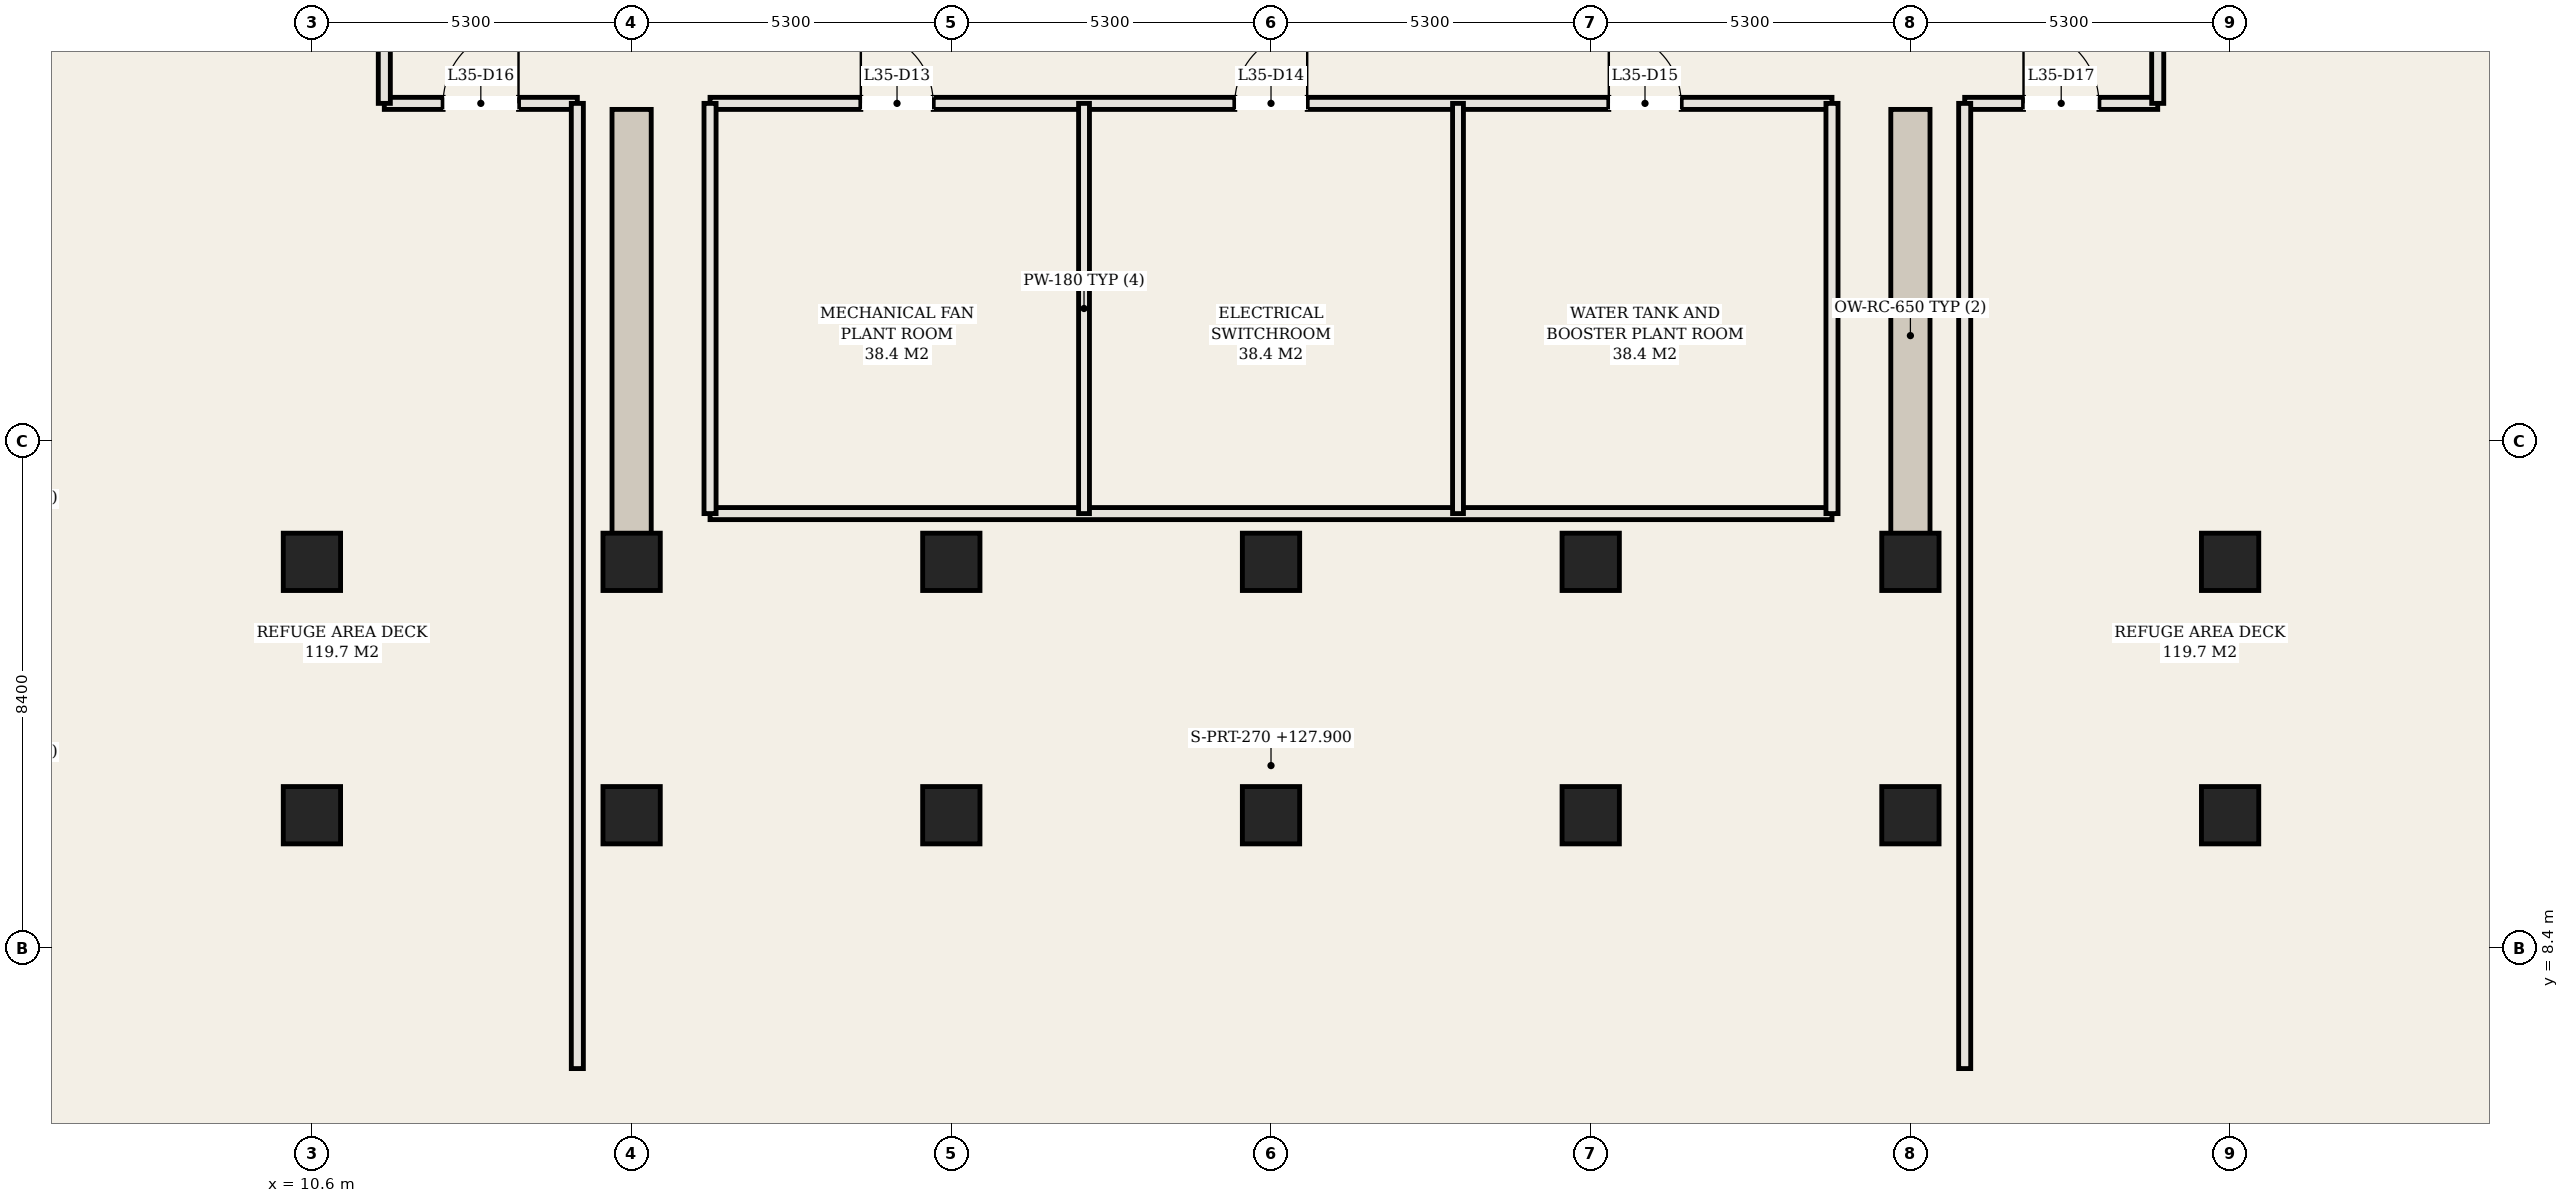
"""IFC4 building model, lengths in metres.
Left out: names, types, materials, properties, quantities, classifications, styles, units other than length and angle.
Written with IfcOpenShell. Run it as: python <this file> out.ifc"""

import sys

from ifc_helpers import new_model, si_unit, direction, frame, frame_2d, origin, origin_2d, place, context, subcontext, project, spatial, rectangle, hollow_rectangle, extrude, element, fill, save


model = new_model("IFC4")
c1 = context("Model", 3, precision=1e-05, world=origin(), true_north=direction((0.0, 1.0)))
c2 = subcontext(c1, "Body", "Model", "MODEL_VIEW")
j1 = project(units=[si_unit("LENGTHUNIT", "METRE"), si_unit("PLANEANGLEUNIT", "RADIAN")], contexts=[c1])
p1 = place(None, origin())
s1 = spatial("IfcSite", under=j1, at=p1, CompositionType="ELEMENT")
p2 = place(p1, origin())
s2 = spatial("IfcBuilding", under=s1, at=p2, CompositionType="ELEMENT")
p3 = place(p2, frame((0.0, 0.0, 127.9)))
s3 = spatial("IfcBuildingStorey", under=s2, at=p3, CompositionType="ELEMENT", Elevation=127.9)
for number, where, z_axis, x_axis in (
    (1, (15.9, 14.8, 0.0), (0.0, 0.0, 1.0), (0.0, 1.0, 0.0)),
    (2, (37.1, 14.8, 0.0), (0.0, 0.0, 1.0), (0.0, 1.0, 0.0)),
):
    element("IfcWall", number, at=place(p3, frame(where, z_axis=z_axis, x_axis=x_axis)), inside=s3, PredefinedType="SHEAR", context=c2, shape_type="SweptSolid", body=[
        extrude(rectangle(XDim=7.5, YDim=0.65, at=frame_2d((3.75, 0.0))), origin(), (0.0, 0.0, 1.0), 6.56),
    ])
for number, where, z_axis, x_axis in (
    (3, (10.6, 14.8, 0.0), (0.0, 0.0, 1.0), (1.0, 0.0, 0.0)),
    (4, (10.6, 10.6, 0.0), (0.0, 0.0, 1.0), (1.0, 0.0, 0.0)),
    (5, (15.9, 14.8, 0.0), (0.0, 0.0, 1.0), (1.0, 0.0, 0.0)),
    (6, (15.9, 10.6, 0.0), (0.0, 0.0, 1.0), (1.0, 0.0, 0.0)),
    (7, (21.2, 14.8, 0.0), (0.0, 0.0, 1.0), (1.0, 0.0, 0.0)),
    (8, (21.2, 10.6, 0.0), (0.0, 0.0, 1.0), (1.0, 0.0, 0.0)),
    (9, (26.5, 14.8, 0.0), (0.0, 0.0, 1.0), (1.0, 0.0, 0.0)),
    (10, (26.5, 10.6, 0.0), (0.0, 0.0, 1.0), (1.0, 0.0, 0.0)),
    (11, (31.8, 14.8, 0.0), (0.0, 0.0, 1.0), (1.0, 0.0, 0.0)),
    (12, (31.8, 10.6, 0.0), (0.0, 0.0, 1.0), (1.0, 0.0, 0.0)),
    (13, (37.1, 14.8, 0.0), (0.0, 0.0, 1.0), (1.0, 0.0, 0.0)),
    (14, (37.1, 10.6, 0.0), (0.0, 0.0, 1.0), (1.0, 0.0, 0.0)),
    (15, (42.4, 14.8, 0.0), (0.0, 0.0, 1.0), (1.0, 0.0, 0.0)),
    (16, (42.4, 10.6, 0.0), (0.0, 0.0, 1.0), (1.0, 0.0, 0.0)),
):
    element("IfcColumn", number, at=place(p3, frame(where, z_axis=z_axis, x_axis=x_axis)), inside=s3, PredefinedType="COLUMN", context=c2, shape_type="SweptSolid", body=[
        extrude(hollow_rectangle(XDim=0.95, YDim=0.95, WallThickness=0.032, at=origin_2d()), origin(), (0.0, 0.0, 1.0), 6.8),
    ])
p4 = place(p3, frame((17.2, 22.4, 0.0), z_axis=(0.0, 0.0, 1.0), x_axis=(1.0, 0.0, 0.0)))
e17 = element("IfcWall", 17, at=p4, inside=s3, PredefinedType="PARTITIONING", context=c2, shape_type="SweptSolid", body=[
    extrude(rectangle(XDim=18.6, YDim=0.2, at=frame_2d((9.3, 0.0))), origin(), (0.0, 0.0, 1.0), 6.56),
])
p5 = place(p4, frame((2.5, 0.0, 0.0)))
e18 = element("IfcOpeningElement", 18, at=p5, cuts=e17, PredefinedType="OPENING", context=c2, shape_type="SweptSolid", body=[
    extrude(rectangle(XDim=1.2, YDim=2.2, at=frame_2d((0.6, 1.1))), frame((0.0, 0.11, 0.0), z_axis=(0.0, -1.0, 0.0), x_axis=(1.0, 0.0, 0.0)), (0.0, 0.0, 1.0), 0.22),
])
p6 = place(p4, frame((8.7, 0.0, 0.0)))
e19 = element("IfcOpeningElement", 19, at=p6, cuts=e17, PredefinedType="OPENING", context=c2, shape_type="SweptSolid", body=[
    extrude(rectangle(XDim=1.2, YDim=2.2, at=frame_2d((0.6, 1.1))), frame((0.0, 0.11, 0.0), z_axis=(0.0, -1.0, 0.0), x_axis=(1.0, 0.0, 0.0)), (0.0, 0.0, 1.0), 0.22),
])
p7 = place(p4, frame((14.9, 0.0, 0.0)))
e20 = element("IfcOpeningElement", 20, at=p7, cuts=e17, PredefinedType="OPENING", context=c2, shape_type="SweptSolid", body=[
    extrude(rectangle(XDim=1.2, YDim=2.2, at=frame_2d((0.6, 1.1))), frame((0.0, 0.11, 0.0), z_axis=(0.0, -1.0, 0.0), x_axis=(1.0, 0.0, 0.0)), (0.0, 0.0, 1.0), 0.22),
])
p8 = place(p3, frame((17.2, 15.6, 0.0), z_axis=(0.0, 0.0, 1.0), x_axis=(1.0, 0.0, 0.0)))
e21 = element("IfcWall", 21, at=p8, inside=s3, PredefinedType="PARTITIONING", context=c2, shape_type="SweptSolid", body=[
    extrude(rectangle(XDim=18.6, YDim=0.2, at=frame_2d((9.3, 0.0))), origin(), (0.0, 0.0, 1.0), 6.56),
])
for number, where, z_axis, x_axis in (
    (22, (17.2, 15.6, 0.0), (0.0, 0.0, 1.0), (0.0, 1.0, 0.0)),
    (23, (35.8, 15.6, 0.0), (0.0, 0.0, 1.0), (0.0, 1.0, 0.0)),
):
    element("IfcWall", number, at=place(p3, frame(where, z_axis=z_axis, x_axis=x_axis)), inside=s3, PredefinedType="PARTITIONING", context=c2, shape_type="SweptSolid", body=[
        extrude(rectangle(XDim=6.8, YDim=0.2, at=frame_2d((3.4, 0.0))), origin(), (0.0, 0.0, 1.0), 6.56),
    ])
for number, where, z_axis, x_axis in (
    (24, (23.4, 15.6, 0.0), (0.0, 0.0, 1.0), (0.0, 1.0, 0.0)),
    (25, (29.6, 15.6, 0.0), (0.0, 0.0, 1.0), (0.0, 1.0, 0.0)),
):
    element("IfcWall", number, at=place(p3, frame(where, z_axis=z_axis, x_axis=x_axis)), inside=s3, PredefinedType="PARTITIONING", context=c2, shape_type="SweptSolid", body=[
        extrude(rectangle(XDim=6.8, YDim=0.18, at=frame_2d((3.4, 0.0))), origin(), (0.0, 0.0, 1.0), 6.56),
    ])
p9 = place(p3, frame((11.8, 22.4, 0.0), z_axis=(0.0, 0.0, 1.0), x_axis=(1.0, 0.0, 0.0)))
e26 = element("IfcWall", 26, at=p9, inside=s3, PredefinedType="PARTITIONING", context=c2, shape_type="SweptSolid", body=[
    extrude(rectangle(XDim=3.2, YDim=0.2, at=frame_2d((1.6, 0.0))), origin(), (0.0, 0.0, 1.0), 6.56),
])
p10 = place(p9, frame((0.975, 0.0, 0.0)))
e27 = element("IfcOpeningElement", 27, at=p10, cuts=e26, PredefinedType="OPENING", context=c2, shape_type="SweptSolid", body=[
    extrude(rectangle(XDim=1.25, YDim=2.2, at=frame_2d((0.625, 1.1))), frame((0.0, 0.11, 0.0), z_axis=(0.0, -1.0, 0.0), x_axis=(1.0, 0.0, 0.0)), (0.0, 0.0, 1.0), 0.22),
])
p11 = place(p3, frame((38.0, 22.4, 0.0), z_axis=(0.0, 0.0, 1.0), x_axis=(1.0, 0.0, 0.0)))
e28 = element("IfcWall", 28, at=p11, inside=s3, PredefinedType="PARTITIONING", context=c2, shape_type="SweptSolid", body=[
    extrude(rectangle(XDim=3.2, YDim=0.2, at=frame_2d((1.6, 0.0))), origin(), (0.0, 0.0, 1.0), 6.56),
])
p12 = place(p11, frame((0.975, 0.0, 0.0)))
e29 = element("IfcOpeningElement", 29, at=p12, cuts=e28, PredefinedType="OPENING", context=c2, shape_type="SweptSolid", body=[
    extrude(rectangle(XDim=1.25, YDim=2.2, at=frame_2d((0.625, 1.1))), frame((0.0, 0.11, 0.0), z_axis=(0.0, -1.0, 0.0), x_axis=(1.0, 0.0, 0.0)), (0.0, 0.0, 1.0), 0.22),
])
for number, where, z_axis, x_axis in (
    (30, (11.8, 22.4, 0.0), (0.0, 0.0, 1.0), (0.0, 1.0, 0.0)),
    (31, (41.2, 22.4, 0.0), (0.0, 0.0, 1.0), (0.0, 1.0, 0.0)),
):
    element("IfcWall", number, at=place(p3, frame(where, z_axis=z_axis, x_axis=x_axis)), inside=s3, PredefinedType="PARTITIONING", context=c2, shape_type="SweptSolid", body=[
        extrude(rectangle(XDim=2.75, YDim=0.2, at=frame_2d((1.375, 0.0))), origin(), (0.0, 0.0, 1.0), 6.56),
    ])
for number, where, z_axis, x_axis in (
    (32, (15.0, 6.4, 0.0), (0.0, 0.0, 1.0), (0.0, 1.0, 0.0)),
    (33, (38.0, 6.4, 0.0), (0.0, 0.0, 1.0), (0.0, 1.0, 0.0)),
):
    element("IfcWall", number, at=place(p3, frame(where, z_axis=z_axis, x_axis=x_axis)), inside=s3, PredefinedType="PARTITIONING", context=c2, shape_type="SweptSolid", body=[
        extrude(rectangle(XDim=16.0, YDim=0.2, at=frame_2d((8.0, 0.0))), origin(), (0.0, 0.0, 1.0), 6.56),
    ])
p13 = place(p5, origin())
e34 = element("IfcDoor", 34, at=p13, inside=s3, OperationType="SINGLE_SWING_LEFT", PredefinedType="DOOR", context=c2, shape_type="SweptSolid", body=[
    extrude(rectangle(XDim=1.2, YDim=2.2, at=frame_2d((0.6, 1.1))), frame((0.0, 0.025, 0.0), z_axis=(0.0, -1.0, 0.0), x_axis=(1.0, 0.0, 0.0)), (0.0, 0.0, 1.0), 0.05),
])
fill(e18, e34)
p14 = place(p6, origin())
e35 = element("IfcDoor", 35, at=p14, inside=s3, OperationType="SINGLE_SWING_RIGHT", PredefinedType="DOOR", context=c2, shape_type="SweptSolid", body=[
    extrude(rectangle(XDim=1.2, YDim=2.2, at=frame_2d((0.6, 1.1))), frame((0.0, 0.025, 0.0), z_axis=(0.0, -1.0, 0.0), x_axis=(1.0, 0.0, 0.0)), (0.0, 0.0, 1.0), 0.05),
])
fill(e19, e35)
p15 = place(p7, origin())
e36 = element("IfcDoor", 36, at=p15, inside=s3, OperationType="SINGLE_SWING_LEFT", PredefinedType="DOOR", context=c2, shape_type="SweptSolid", body=[
    extrude(rectangle(XDim=1.2, YDim=2.2, at=frame_2d((0.6, 1.1))), frame((0.0, 0.025, 0.0), z_axis=(0.0, -1.0, 0.0), x_axis=(1.0, 0.0, 0.0)), (0.0, 0.0, 1.0), 0.05),
])
fill(e20, e36)
p16 = place(p10, origin())
e37 = element("IfcDoor", 37, at=p16, inside=s3, OperationType="SINGLE_SWING_RIGHT", PredefinedType="DOOR", context=c2, shape_type="SweptSolid", body=[
    extrude(rectangle(XDim=1.25, YDim=2.2, at=frame_2d((0.625, 1.1))), frame((0.0, 0.025, 0.0), z_axis=(0.0, -1.0, 0.0), x_axis=(1.0, 0.0, 0.0)), (0.0, 0.0, 1.0), 0.05),
])
fill(e27, e37)
p17 = place(p12, origin())
e38 = element("IfcDoor", 38, at=p17, inside=s3, OperationType="SINGLE_SWING_LEFT", PredefinedType="DOOR", context=c2, shape_type="SweptSolid", body=[
    extrude(rectangle(XDim=1.25, YDim=2.2, at=frame_2d((0.625, 1.1))), frame((0.0, 0.025, 0.0), z_axis=(0.0, -1.0, 0.0), x_axis=(1.0, 0.0, 0.0)), (0.0, 0.0, 1.0), 0.05),
])
fill(e29, e38)
save(model, sys.argv[1])
